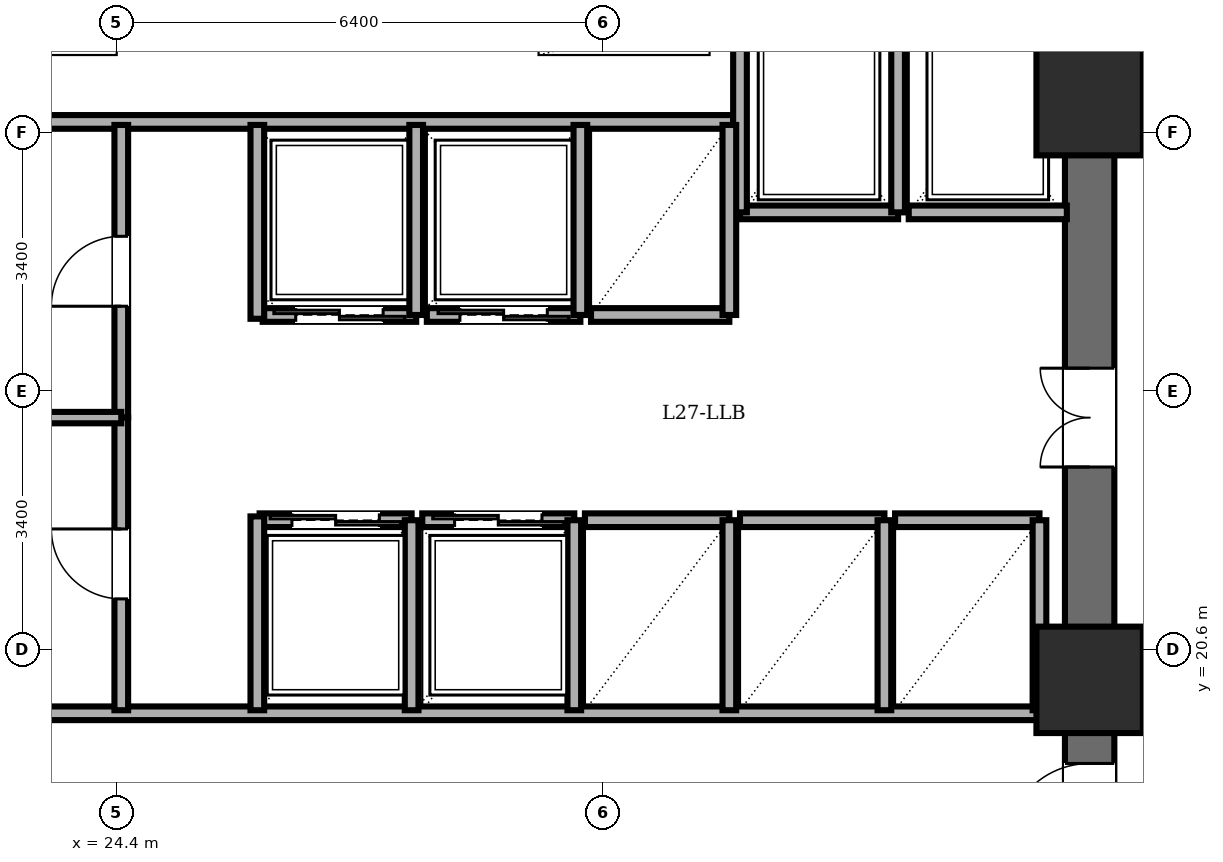
"""IFC4 building model, lengths in metres.
Left out: names, types, materials, properties, quantities, classifications, styles, units other than length and angle.
Written with IfcOpenShell. Run it as: python <this file> out.ifc"""

import sys

from ifc_helpers import new_model, si_unit, direction, frame, frame_2d, origin, origin_2d, place, context, subcontext, project, spatial, rectangle, extrude, element, fill, save


model = new_model("IFC4")
c1 = context("Model", 3, precision=1e-05, world=origin(), true_north=direction((0.0, 1.0)))
c2 = subcontext(c1, "Body", "Model", "MODEL_VIEW")
j1 = project(units=[si_unit("LENGTHUNIT", "METRE"), si_unit("PLANEANGLEUNIT", "RADIAN")], contexts=[c1])
p1 = place(None, origin())
s1 = spatial("IfcSite", under=j1, at=p1, CompositionType="ELEMENT")
p2 = place(p1, origin())
s2 = spatial("IfcBuilding", under=s1, at=p2, CompositionType="ELEMENT")
p3 = place(p2, frame((0.0, 0.0, 104.3)))
s3 = spatial("IfcBuildingStorey", under=s2, at=p3, CompositionType="ELEMENT", Elevation=104.3)
for number, where, z_axis, x_axis in (
    (1, (37.2, 20.2, 0.0), (0.0, 0.0, 1.0), (1.0, 0.0, 0.0)),
    (2, (37.2, 27.8, 0.0), (0.0, 0.0, 1.0), (1.0, 0.0, 0.0)),
):
    element("IfcColumn", number, at=place(p3, frame(where, z_axis=z_axis, x_axis=x_axis)), inside=s3, PredefinedType="COLUMN", context=c2, shape_type="SweptSolid", body=[
        extrude(rectangle(XDim=1.4, YDim=1.4, at=origin_2d()), origin(), (0.0, 0.0, 1.0), 3.6),
    ])
p4 = place(p3, frame((37.2, 14.4, 0.0), z_axis=(0.0, 0.0, 1.0), x_axis=(0.0, 1.0, 0.0)))
e3 = element("IfcWall", 3, at=p4, inside=s3, PredefinedType="SHEAR", context=c2, shape_type="SweptSolid", body=[
    extrude(rectangle(XDim=19.2, YDim=0.65, at=frame_2d((9.6, 0.0))), origin(), (0.0, 0.0, 1.0), 3.4),
])
p5 = place(p4, frame((15.8, 0.0, 0.0)))
e4 = element("IfcOpeningElement", 4, at=p5, cuts=e3, PredefinedType="OPENING", context=c2, shape_type="SweptSolid", body=[
    extrude(rectangle(XDim=1.15, YDim=2.15, at=frame_2d((0.575, 1.075))), frame((0.0, 0.335, 0.0), z_axis=(0.0, -1.0, 0.0), x_axis=(1.0, 0.0, 0.0)), (0.0, 0.0, 1.0), 0.67),
])
p6 = place(p4, frame((3.6, 0.0, 0.0)))
e5 = element("IfcOpeningElement", 5, at=p6, cuts=e3, PredefinedType="OPENING", context=c2, shape_type="SweptSolid", body=[
    extrude(rectangle(XDim=1.1, YDim=2.15, at=frame_2d((0.55, 1.075))), frame((0.0, 0.335, 0.0), z_axis=(0.0, -1.0, 0.0), x_axis=(1.0, 0.0, 0.0)), (0.0, 0.0, 1.0), 0.67),
])
p7 = place(p4, frame((8.6, 0.0, 0.0)))
e6 = element("IfcOpeningElement", 6, at=p7, cuts=e3, PredefinedType="OPENING", context=c2, shape_type="SweptSolid", body=[
    extrude(rectangle(XDim=1.3, YDim=2.2, at=frame_2d((0.65, 1.1))), frame((0.0, 0.335, 0.0), z_axis=(0.0, -1.0, 0.0), x_axis=(1.0, 0.0, 0.0)), (0.0, 0.0, 1.0), 0.67),
])
p8 = place(p3, frame((21.95, 27.54, 0.0), z_axis=(0.0, 0.0, 1.0), x_axis=(1.0, 0.0, 0.0)))
e7 = element("IfcWall", 7, at=p8, inside=s3, PredefinedType="PARTITIONING", context=c2, shape_type="SweptSolid", body=[
    extrude(rectangle(XDim=10.56, YDim=0.18, at=frame_2d((5.28, 0.0))), origin(), (0.0, 0.0, 1.0), 3.4),
])
p9 = place(p3, frame((21.95, 19.76, 0.0), z_axis=(0.0, 0.0, 1.0), x_axis=(1.0, 0.0, 0.0)))
e8 = element("IfcWall", 8, at=p9, inside=s3, PredefinedType="PARTITIONING", context=c2, shape_type="SweptSolid", body=[
    extrude(rectangle(XDim=14.87, YDim=0.18, at=frame_2d((7.435, 0.0))), origin(), (0.0, 0.0, 1.0), 3.4),
])
p10 = place(p3, frame((34.68, 26.35, 0.0), z_axis=(0.0, 0.0, 1.0), x_axis=(-1.0, 0.0, 0.0)))
e9 = element("IfcWall", 9, at=p10, inside=s3, PredefinedType="PARTITIONING", context=c2, shape_type="SweptSolid", body=[
    extrude(rectangle(XDim=2.08, YDim=0.18, at=frame_2d((1.04, 0.0))), origin(), (0.0, 0.0, 1.0), 3.4),
])
for number, where, z_axis, x_axis in (
    (10, (34.68, 26.35, 0.0), (0.0, 0.0, 1.0), (0.0, 1.0, 0.0)),
    (11, (32.6, 29.08, 0.0), (0.0, 0.0, 1.0), (0.0, -1.0, 0.0)),
):
    element("IfcWall", number, at=place(p3, frame(where, z_axis=z_axis, x_axis=x_axis)), inside=s3, PredefinedType="PARTITIONING", context=c2, shape_type="SweptSolid", body=[
        extrude(rectangle(XDim=2.73, YDim=0.18, at=frame_2d((1.365, 0.0))), origin(), (0.0, 0.0, 1.0), 3.4),
    ])
p11 = place(p3, frame((36.9, 26.35, 0.0), z_axis=(0.0, 0.0, 1.0), x_axis=(-1.0, 0.0, 0.0)))
e12 = element("IfcWall", 12, at=p11, inside=s3, PredefinedType="PARTITIONING", context=c2, shape_type="SweptSolid", body=[
    extrude(rectangle(XDim=2.08, YDim=0.18, at=frame_2d((1.04, 0.0))), origin(), (0.0, 0.0, 1.0), 3.4),
])
p12 = place(p3, frame((28.34, 25.0, 0.0), z_axis=(0.0, 0.0, 1.0), x_axis=(-1.0, 0.0, 0.0)))
e13 = element("IfcWall", 13, at=p12, inside=s3, PredefinedType="PARTITIONING", context=c2, shape_type="SweptSolid", body=[
    extrude(rectangle(XDim=2.02, YDim=0.18, at=frame_2d((1.01, 0.0))), origin(), (0.0, 0.0, 1.0), 3.4),
])
p13 = place(p12, frame((0.435, 0.0, 0.0)))
e14 = element("IfcOpeningElement", 14, at=p13, cuts=e13, PredefinedType="OPENING", context=c2, shape_type="SweptSolid", body=[
    extrude(rectangle(XDim=1.15, YDim=2.2, at=frame_2d((0.575, 1.1))), frame((0.0, 0.1, 0.0), z_axis=(0.0, -1.0, 0.0), x_axis=(1.0, 0.0, 0.0)), (0.0, 0.0, 1.0), 0.2),
])
p14 = place(p3, frame((28.34, 25.0, 0.0), z_axis=(0.0, 0.0, 1.0), x_axis=(0.0, 1.0, 0.0)))
e15 = element("IfcWall", 15, at=p14, inside=s3, PredefinedType="PARTITIONING", context=c2, shape_type="SweptSolid", body=[
    extrude(rectangle(XDim=2.5, YDim=0.18, at=frame_2d((1.25, 0.0))), origin(), (0.0, 0.0, 1.0), 3.4),
])
p15 = place(p3, frame((30.5, 25.0, 0.0), z_axis=(0.0, 0.0, 1.0), x_axis=(-1.0, 0.0, 0.0)))
e16 = element("IfcWall", 16, at=p15, inside=s3, PredefinedType="PARTITIONING", context=c2, shape_type="SweptSolid", body=[
    extrude(rectangle(XDim=2.02, YDim=0.18, at=frame_2d((1.01, 0.0))), origin(), (0.0, 0.0, 1.0), 3.4),
])
p16 = place(p15, frame((0.435, 0.0, 0.0)))
e17 = element("IfcOpeningElement", 17, at=p16, cuts=e16, PredefinedType="OPENING", context=c2, shape_type="SweptSolid", body=[
    extrude(rectangle(XDim=1.15, YDim=2.2, at=frame_2d((0.575, 1.1))), frame((0.0, 0.1, 0.0), z_axis=(0.0, -1.0, 0.0), x_axis=(1.0, 0.0, 0.0)), (0.0, 0.0, 1.0), 0.2),
])
p17 = place(p3, frame((30.5, 25.0, 0.0), z_axis=(0.0, 0.0, 1.0), x_axis=(0.0, 1.0, 0.0)))
e18 = element("IfcWall", 18, at=p17, inside=s3, PredefinedType="PARTITIONING", context=c2, shape_type="SweptSolid", body=[
    extrude(rectangle(XDim=2.5, YDim=0.18, at=frame_2d((1.25, 0.0))), origin(), (0.0, 0.0, 1.0), 3.4),
])
p18 = place(p3, frame((26.28, 22.3, 0.0), z_axis=(0.0, 0.0, 1.0), x_axis=(1.0, 0.0, 0.0)))
e19 = element("IfcWall", 19, at=p18, inside=s3, PredefinedType="PARTITIONING", context=c2, shape_type="SweptSolid", body=[
    extrude(rectangle(XDim=2.0, YDim=0.18, at=frame_2d((1.0, 0.0))), origin(), (0.0, 0.0, 1.0), 3.4),
])
p19 = place(p18, frame((0.425, 0.0, 0.0)))
e20 = element("IfcOpeningElement", 20, at=p19, cuts=e19, PredefinedType="OPENING", context=c2, shape_type="SweptSolid", body=[
    extrude(rectangle(XDim=1.15, YDim=2.2, at=frame_2d((0.575, 1.1))), frame((0.0, 0.1, 0.0), z_axis=(0.0, -1.0, 0.0), x_axis=(1.0, 0.0, 0.0)), (0.0, 0.0, 1.0), 0.2),
])
p20 = place(p3, frame((28.28, 19.8, 0.0), z_axis=(0.0, 0.0, 1.0), x_axis=(0.0, 1.0, 0.0)))
e21 = element("IfcWall", 21, at=p20, inside=s3, PredefinedType="PARTITIONING", context=c2, shape_type="SweptSolid", body=[
    extrude(rectangle(XDim=2.5, YDim=0.18, at=frame_2d((1.25, 0.0))), origin(), (0.0, 0.0, 1.0), 3.4),
])
p21 = place(p3, frame((28.42, 22.3, 0.0), z_axis=(0.0, 0.0, 1.0), x_axis=(1.0, 0.0, 0.0)))
e22 = element("IfcWall", 22, at=p21, inside=s3, PredefinedType="PARTITIONING", context=c2, shape_type="SweptSolid", body=[
    extrude(rectangle(XDim=2.0, YDim=0.18, at=frame_2d((1.0, 0.0))), origin(), (0.0, 0.0, 1.0), 3.4),
])
p22 = place(p21, frame((0.425, 0.0, 0.0)))
e23 = element("IfcOpeningElement", 23, at=p22, cuts=e22, PredefinedType="OPENING", context=c2, shape_type="SweptSolid", body=[
    extrude(rectangle(XDim=1.15, YDim=2.2, at=frame_2d((0.575, 1.1))), frame((0.0, 0.1, 0.0), z_axis=(0.0, -1.0, 0.0), x_axis=(1.0, 0.0, 0.0)), (0.0, 0.0, 1.0), 0.2),
])
p23 = place(p3, frame((30.42, 19.8, 0.0), z_axis=(0.0, 0.0, 1.0), x_axis=(0.0, 1.0, 0.0)))
e24 = element("IfcWall", 24, at=p23, inside=s3, PredefinedType="PARTITIONING", context=c2, shape_type="SweptSolid", body=[
    extrude(rectangle(XDim=2.5, YDim=0.18, at=frame_2d((1.25, 0.0))), origin(), (0.0, 0.0, 1.0), 3.4),
])
p24 = place(p3, frame((32.46, 25.0, 0.0), z_axis=(0.0, 0.0, 1.0), x_axis=(-1.0, 0.0, 0.0)))
e25 = element("IfcWall", 25, at=p24, inside=s3, PredefinedType="PARTITIONING", context=c2, shape_type="SweptSolid", body=[
    extrude(rectangle(XDim=1.82, YDim=0.18, at=frame_2d((0.91, 0.0))), origin(), (0.0, 0.0, 1.0), 3.4),
])
p25 = place(p3, frame((32.46, 25.0, 0.0), z_axis=(0.0, 0.0, 1.0), x_axis=(0.0, 1.0, 0.0)))
e26 = element("IfcWall", 26, at=p25, inside=s3, PredefinedType="PARTITIONING", context=c2, shape_type="SweptSolid", body=[
    extrude(rectangle(XDim=2.5, YDim=0.18, at=frame_2d((1.25, 0.0))), origin(), (0.0, 0.0, 1.0), 3.4),
])
p26 = place(p3, frame((30.56, 22.3, 0.0), z_axis=(0.0, 0.0, 1.0), x_axis=(1.0, 0.0, 0.0)))
e27 = element("IfcWall", 27, at=p26, inside=s3, PredefinedType="PARTITIONING", context=c2, shape_type="SweptSolid", body=[
    extrude(rectangle(XDim=1.9, YDim=0.18, at=frame_2d((0.95, 0.0))), origin(), (0.0, 0.0, 1.0), 3.4),
])
p27 = place(p3, frame((32.46, 19.8, 0.0), z_axis=(0.0, 0.0, 1.0), x_axis=(0.0, 1.0, 0.0)))
e28 = element("IfcWall", 28, at=p27, inside=s3, PredefinedType="PARTITIONING", context=c2, shape_type="SweptSolid", body=[
    extrude(rectangle(XDim=2.5, YDim=0.18, at=frame_2d((1.25, 0.0))), origin(), (0.0, 0.0, 1.0), 3.4),
])
p28 = place(p3, frame((32.6, 22.3, 0.0), z_axis=(0.0, 0.0, 1.0), x_axis=(1.0, 0.0, 0.0)))
e29 = element("IfcWall", 29, at=p28, inside=s3, PredefinedType="PARTITIONING", context=c2, shape_type="SweptSolid", body=[
    extrude(rectangle(XDim=1.9, YDim=0.18, at=frame_2d((0.95, 0.0))), origin(), (0.0, 0.0, 1.0), 3.4),
])
p29 = place(p3, frame((34.5, 19.8, 0.0), z_axis=(0.0, 0.0, 1.0), x_axis=(0.0, 1.0, 0.0)))
e30 = element("IfcWall", 30, at=p29, inside=s3, PredefinedType="PARTITIONING", context=c2, shape_type="SweptSolid", body=[
    extrude(rectangle(XDim=2.5, YDim=0.18, at=frame_2d((1.25, 0.0))), origin(), (0.0, 0.0, 1.0), 3.4),
])
p30 = place(p3, frame((34.64, 22.3, 0.0), z_axis=(0.0, 0.0, 1.0), x_axis=(1.0, 0.0, 0.0)))
e31 = element("IfcWall", 31, at=p30, inside=s3, PredefinedType="PARTITIONING", context=c2, shape_type="SweptSolid", body=[
    extrude(rectangle(XDim=1.9, YDim=0.18, at=frame_2d((0.95, 0.0))), origin(), (0.0, 0.0, 1.0), 3.4),
])
p31 = place(p3, frame((36.54, 19.8, 0.0), z_axis=(0.0, 0.0, 1.0), x_axis=(0.0, 1.0, 0.0)))
e32 = element("IfcWall", 32, at=p31, inside=s3, PredefinedType="PARTITIONING", context=c2, shape_type="SweptSolid", body=[
    extrude(rectangle(XDim=2.5, YDim=0.18, at=frame_2d((1.25, 0.0))), origin(), (0.0, 0.0, 1.0), 3.4),
])
p32 = place(p3, frame((24.46, 23.65, 0.0), z_axis=(0.0, 0.0, 1.0), x_axis=(0.0, 1.0, 0.0)))
e33 = element("IfcWall", 33, at=p32, inside=s3, PredefinedType="PARTITIONING", context=c2, shape_type="SweptSolid", body=[
    extrude(rectangle(XDim=3.85, YDim=0.18, at=frame_2d((1.925, 0.0))), origin(), (0.0, 0.0, 1.0), 3.4),
])
p33 = place(p32, frame((1.465, 0.0, 0.0)))
e34 = element("IfcOpeningElement", 34, at=p33, cuts=e33, PredefinedType="OPENING", context=c2, shape_type="SweptSolid", body=[
    extrude(rectangle(XDim=0.92, YDim=2.1, at=frame_2d((0.46, 1.05))), frame((0.0, 0.1, 0.0), z_axis=(0.0, -1.0, 0.0), x_axis=(1.0, 0.0, 0.0)), (0.0, 0.0, 1.0), 0.2),
])
p34 = place(p3, frame((24.46, 19.8, 0.0), z_axis=(0.0, 0.0, 1.0), x_axis=(0.0, 1.0, 0.0)))
e35 = element("IfcWall", 35, at=p34, inside=s3, PredefinedType="PARTITIONING", context=c2, shape_type="SweptSolid", body=[
    extrude(rectangle(XDim=3.85, YDim=0.18, at=frame_2d((1.925, 0.0))), origin(), (0.0, 0.0, 1.0), 3.4),
])
p35 = place(p34, frame((1.465, 0.0, 0.0)))
e36 = element("IfcOpeningElement", 36, at=p35, cuts=e35, PredefinedType="OPENING", context=c2, shape_type="SweptSolid", body=[
    extrude(rectangle(XDim=0.92, YDim=2.1, at=frame_2d((0.46, 1.05))), frame((0.0, 0.1, 0.0), z_axis=(0.0, -1.0, 0.0), x_axis=(1.0, 0.0, 0.0)), (0.0, 0.0, 1.0), 0.2),
])
p36 = place(p3, frame((21.95, 23.65, 0.0), z_axis=(0.0, 0.0, 1.0), x_axis=(1.0, 0.0, 0.0)))
e37 = element("IfcWall", 37, at=p36, inside=s3, PredefinedType="PARTITIONING", context=c2, shape_type="SweptSolid", body=[
    extrude(rectangle(XDim=2.51, YDim=0.15, at=frame_2d((1.255, 0.0))), origin(), (0.0, 0.0, 1.0), 3.4),
])
for number, where, z_axis, x_axis in (
    (38, (26.25, 24.95, 0.0), (0.0, 0.0, 1.0), (0.0, 1.0, 0.0)),
    (39, (26.25, 19.8, 0.0), (0.0, 0.0, 1.0), (0.0, 1.0, 0.0)),
):
    element("IfcWall", number, at=place(p3, frame(where, z_axis=z_axis, x_axis=x_axis)), inside=s3, PredefinedType="PARTITIONING", context=c2, shape_type="SweptSolid", body=[
        extrude(rectangle(XDim=2.55, YDim=0.18, at=frame_2d((1.275, 0.0))), origin(), (0.0, 0.0, 1.0), 3.4),
    ])
p37 = place(p6, origin())
e40 = element("IfcDoor", 40, at=p37, inside=s3, OperationType="SINGLE_SWING_LEFT", PredefinedType="DOOR", context=c2, shape_type="SweptSolid", body=[
    extrude(rectangle(XDim=1.1, YDim=2.15, at=frame_2d((0.55, 1.075))), frame((0.0, 0.025, 0.0), z_axis=(0.0, -1.0, 0.0), x_axis=(1.0, 0.0, 0.0)), (0.0, 0.0, 1.0), 0.05),
])
fill(e5, e40)
p38 = place(p13, origin())
e41 = element("IfcDoor", 41, at=p38, inside=s3, OperationType="DOUBLE_DOOR_SLIDING", PredefinedType="DOOR", context=c2, shape_type="SweptSolid", body=[
    extrude(rectangle(XDim=1.15, YDim=2.2, at=frame_2d((0.575, 1.1))), frame((0.0, 0.025, 0.0), z_axis=(0.0, -1.0, 0.0), x_axis=(1.0, 0.0, 0.0)), (0.0, 0.0, 1.0), 0.05),
])
fill(e14, e41)
p39 = place(p16, origin())
e42 = element("IfcDoor", 42, at=p39, inside=s3, OperationType="DOUBLE_DOOR_SLIDING", PredefinedType="DOOR", context=c2, shape_type="SweptSolid", body=[
    extrude(rectangle(XDim=1.15, YDim=2.2, at=frame_2d((0.575, 1.1))), frame((0.0, 0.025, 0.0), z_axis=(0.0, -1.0, 0.0), x_axis=(1.0, 0.0, 0.0)), (0.0, 0.0, 1.0), 0.05),
])
fill(e17, e42)
p40 = place(p19, origin())
e43 = element("IfcDoor", 43, at=p40, inside=s3, OperationType="DOUBLE_DOOR_SLIDING", PredefinedType="DOOR", context=c2, shape_type="SweptSolid", body=[
    extrude(rectangle(XDim=1.15, YDim=2.2, at=frame_2d((0.575, 1.1))), frame((0.0, 0.025, 0.0), z_axis=(0.0, -1.0, 0.0), x_axis=(1.0, 0.0, 0.0)), (0.0, 0.0, 1.0), 0.05),
])
fill(e20, e43)
p41 = place(p22, origin())
e44 = element("IfcDoor", 44, at=p41, inside=s3, OperationType="DOUBLE_DOOR_SLIDING", PredefinedType="DOOR", context=c2, shape_type="SweptSolid", body=[
    extrude(rectangle(XDim=1.15, YDim=2.2, at=frame_2d((0.575, 1.1))), frame((0.0, 0.025, 0.0), z_axis=(0.0, -1.0, 0.0), x_axis=(1.0, 0.0, 0.0)), (0.0, 0.0, 1.0), 0.05),
])
fill(e23, e44)
p42 = place(p33, origin())
e45 = element("IfcDoor", 45, at=p42, inside=s3, OperationType="SINGLE_SWING_LEFT", PredefinedType="DOOR", context=c2, shape_type="SweptSolid", body=[
    extrude(rectangle(XDim=0.92, YDim=2.1, at=frame_2d((0.46, 1.05))), frame((0.0, 0.025, 0.0), z_axis=(0.0, -1.0, 0.0), x_axis=(1.0, 0.0, 0.0)), (0.0, 0.0, 1.0), 0.05),
])
fill(e34, e45)
p43 = place(p35, origin())
e46 = element("IfcDoor", 46, at=p43, inside=s3, OperationType="SINGLE_SWING_RIGHT", PredefinedType="DOOR", context=c2, shape_type="SweptSolid", body=[
    extrude(rectangle(XDim=0.92, YDim=2.1, at=frame_2d((0.46, 1.05))), frame((0.0, 0.025, 0.0), z_axis=(0.0, -1.0, 0.0), x_axis=(1.0, 0.0, 0.0)), (0.0, 0.0, 1.0), 0.05),
])
fill(e36, e46)
p44 = place(p7, origin())
e47 = element("IfcDoor", 47, at=p44, inside=s3, OperationType="DOUBLE_DOOR_SINGLE_SWING", PredefinedType="DOOR", context=c2, shape_type="SweptSolid", body=[
    extrude(rectangle(XDim=1.3, YDim=2.2, at=frame_2d((0.65, 1.1))), frame((0.0, 0.025, 0.0), z_axis=(0.0, -1.0, 0.0), x_axis=(1.0, 0.0, 0.0)), (0.0, 0.0, 1.0), 0.05),
])
fill(e6, e47)
save(model, sys.argv[1])
